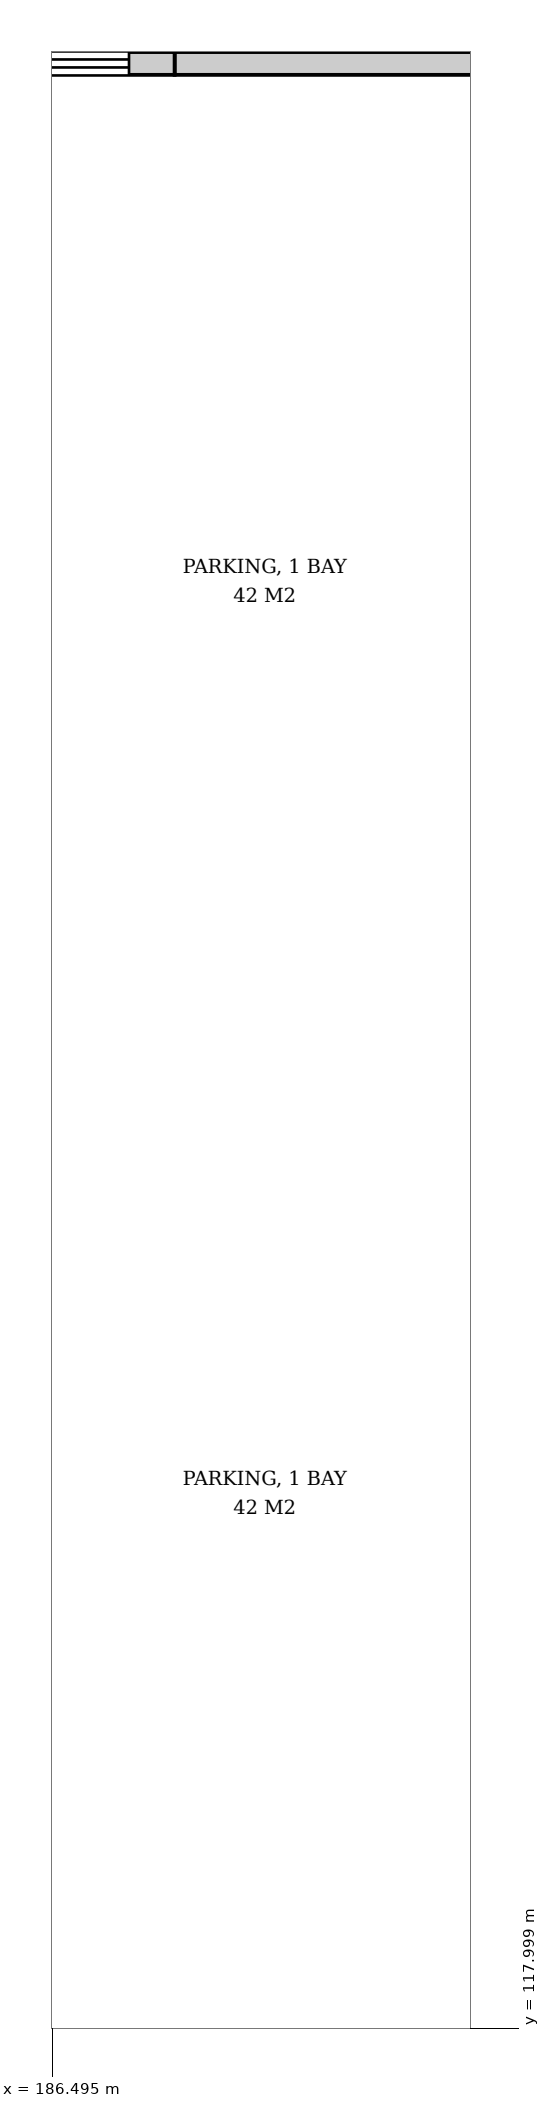
"""IFC4 building model, lengths in metres.
Left out: names, types, materials, properties, quantities, classifications, styles, units other than length and angle.
Written with IfcOpenShell. Run it as: python <this file> out.ifc"""

import sys

from ifc_helpers import new_model, si_unit, direction, frame, frame_2d, origin, place, context, subcontext, project, spatial, rectangle, extrude, element, fill, save


model = new_model("IFC4")
c1 = context("Model", 3, precision=1e-05, world=origin(), true_north=direction((0.0, 1.0)))
c2 = subcontext(c1, "Body", "Model", "MODEL_VIEW")
j1 = project(units=[si_unit("LENGTHUNIT", "METRE"), si_unit("PLANEANGLEUNIT", "RADIAN")], contexts=[c1])
p1 = place(None, origin())
s1 = spatial("IfcSite", under=j1, at=p1, CompositionType="ELEMENT")
p2 = place(p1, origin())
s2 = spatial("IfcBuilding", under=s1, at=p2, CompositionType="ELEMENT")
p3 = place(p2, origin())
s3 = spatial("IfcBuildingStorey", under=s2, at=p3, CompositionType="ELEMENT", Elevation=0.0)
p4 = place(p3, frame((180.4, 143.85, -0.1), z_axis=(0.0, 0.0, 1.0), x_axis=(1.0, 0.0, 0.0)))
e1 = element("IfcWall", 1, at=p4, inside=s3, PredefinedType="SOLIDWALL", context=c2, shape_type="SweptSolid", body=[
    extrude(rectangle(XDim=7.7, YDim=0.3, at=frame_2d((3.85, 0.0))), origin(), (0.0, 0.0, 1.0), 2.5),
])
p5 = place(p4, frame((0.6, 0.0, 0.1)))
e2 = element("IfcOpeningElement", 2, at=p5, cuts=e1, PredefinedType="OPENING", context=c2, shape_type="SweptSolid", body=[
    extrude(rectangle(XDim=6.5, YDim=2.1, at=frame_2d((3.25, 1.05))), frame((0.0, 0.16, 0.0), z_axis=(0.0, -1.0, 0.0), x_axis=(1.0, 0.0, 0.0)), (0.0, 0.0, 1.0), 0.32),
])
p6 = place(p3, frame((188.1, 143.85, -0.1), z_axis=(0.0, 0.0, 1.0), x_axis=(1.0, 0.0, 0.0)))
e3 = element("IfcWall", 3, at=p6, inside=s3, PredefinedType="SOLIDWALL", context=c2, shape_type="SweptSolid", body=[
    extrude(rectangle(XDim=7.8, YDim=0.3, at=frame_2d((3.9, 0.0))), origin(), (0.0, 0.0, 1.0), 1.3),
])
p7 = place(p5, origin())
e4 = element("IfcDoor", 4, at=p7, inside=s3, OperationType="SLIDING_TO_LEFT", PredefinedType="DOOR", context=c2, shape_type="SweptSolid", body=[
    extrude(rectangle(XDim=6.5, YDim=2.1, at=frame_2d((3.25, 1.05))), frame((0.0, 0.025, 0.0), z_axis=(0.0, -1.0, 0.0), x_axis=(1.0, 0.0, 0.0)), (0.0, 0.0, 1.0), 0.05),
])
fill(e2, e4)
save(model, sys.argv[1])
